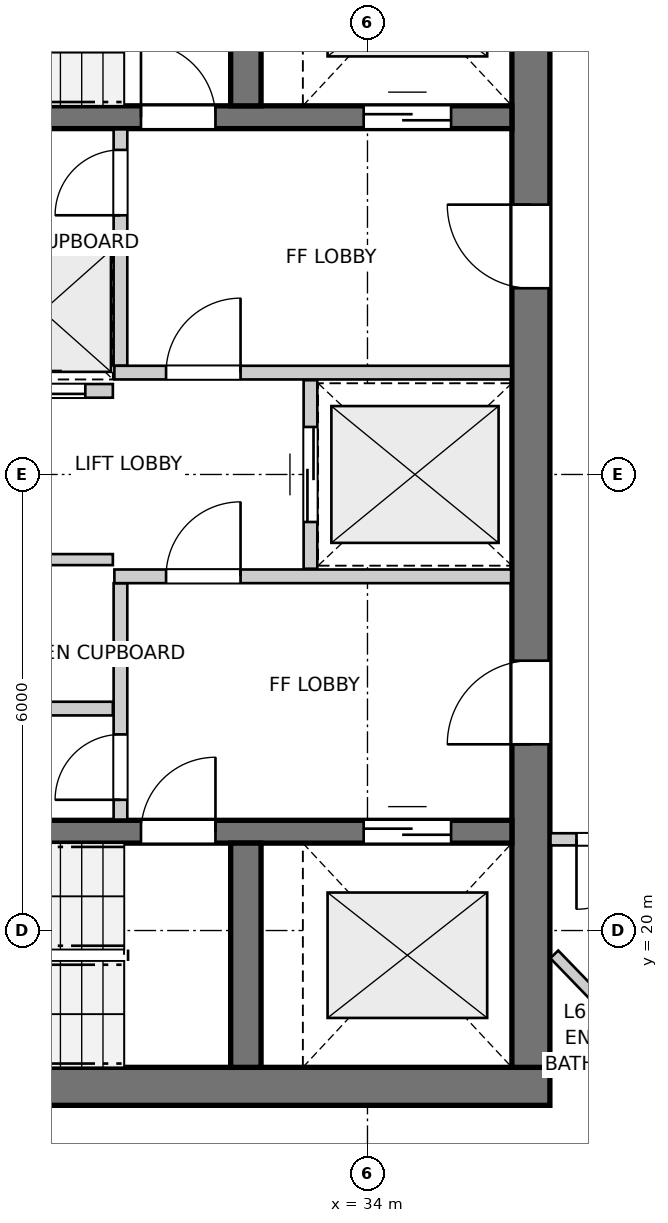
"""IFC4 building model, lengths in metres.
Left out: names, types, materials, properties, quantities, classifications, styles, units other than length and angle.
Written with IfcOpenShell. Run it as: python <this file> out.ifc"""

import sys

from ifc_helpers import new_model, si_unit, direction, frame, frame_2d, origin, place, context, subcontext, project, spatial, rectangle, extrude, source, transform, mapped, element, fill, save


model = new_model("IFC4")
c1 = context("Model", 3, precision=1e-05, world=origin(), true_north=direction((0.0, 1.0)))
c2 = subcontext(c1, "Body", "Model", "MODEL_VIEW")
j1 = project(units=[si_unit("LENGTHUNIT", "METRE"), si_unit("PLANEANGLEUNIT", "RADIAN")], contexts=[c1])
p1 = place(None, origin())
s1 = spatial("IfcSite", under=j1, at=p1, CompositionType="ELEMENT")
p2 = place(p1, origin())
s2 = spatial("IfcBuilding", under=s1, at=p2, CompositionType="ELEMENT")
p3 = place(p2, frame((0.0, 0.0, 205.2)))
s3 = spatial("IfcBuildingStorey", under=s2, at=p3, CompositionType="ELEMENT", Elevation=205.2)
p4 = place(p3, frame((24.3, 17.95, 0.0), z_axis=(0.0, 0.0, 1.0), x_axis=(1.0, 0.0, 0.0)))
e1 = element("IfcWall", 1, at=p4, inside=s3, PredefinedType="SHEAR", context=c2, shape_type="SweptSolid", body=[
    extrude(rectangle(XDim=12.1, YDim=0.5, at=frame_2d((6.05, 0.0))), origin(), (0.0, 0.0, 1.0), 2.935),
])
p5 = place(p3, frame((36.15, 18.2, 0.0), z_axis=(0.0, 0.0, 1.0), x_axis=(0.0, 1.0, 0.0)))
e2 = element("IfcWall", 2, at=p5, inside=s3, PredefinedType="SHEAR", context=c2, shape_type="SweptSolid", body=[
    extrude(rectangle(XDim=15.6, YDim=0.5, at=frame_2d((7.8, 0.0))), origin(), (0.0, 0.0, 1.0), 2.935),
])
p6 = place(p5, frame((4.25, 0.0, 0.0)))
e3 = element("IfcOpeningElement", 3, at=p6, cuts=e2, PredefinedType="OPENING", context=c2, shape_type="SweptSolid", body=[
    extrude(rectangle(XDim=1.1, YDim=2.15, at=frame_2d((0.55, 1.075))), frame((0.0, 0.26, 0.0), z_axis=(0.0, -1.0, 0.0), x_axis=(1.0, 0.0, 0.0)), (0.0, 0.0, 1.0), 0.52),
])
p7 = place(p5, frame((10.25, 0.0, 0.0)))
e4 = element("IfcOpeningElement", 4, at=p7, cuts=e2, PredefinedType="OPENING", context=c2, shape_type="SweptSolid", body=[
    extrude(rectangle(XDim=1.1, YDim=2.15, at=frame_2d((0.55, 1.075))), frame((0.0, 0.26, 0.0), z_axis=(0.0, -1.0, 0.0), x_axis=(1.0, 0.0, 0.0)), (0.0, 0.0, 1.0), 0.52),
])
p8 = place(p3, frame((24.8, 21.3, 0.0), z_axis=(0.0, 0.0, 1.0), x_axis=(1.0, 0.0, 0.0)))
e5 = element("IfcWall", 5, at=p8, inside=s3, PredefinedType="SHEAR", context=c2, shape_type="SweptSolid", body=[
    extrude(rectangle(XDim=11.1, YDim=0.3, at=frame_2d((5.55, 0.0))), origin(), (0.0, 0.0, 1.0), 2.935),
])
p9 = place(p8, frame((6.22, 0.0, 0.0)))
e6 = element("IfcOpeningElement", 6, at=p9, cuts=e5, PredefinedType="OPENING", context=c2, shape_type="SweptSolid", body=[
    extrude(rectangle(XDim=0.98, YDim=2.15, at=frame_2d((0.49, 1.075))), frame((0.0, 0.16, 0.0), z_axis=(0.0, -1.0, 0.0), x_axis=(1.0, 0.0, 0.0)), (0.0, 0.0, 1.0), 0.32),
])
p10 = place(p8, frame((9.15, 0.0, 0.0)))
e7 = element("IfcOpeningElement", 7, at=p10, cuts=e5, PredefinedType="OPENING", context=c2, shape_type="SweptSolid", body=[
    extrude(rectangle(XDim=1.15, YDim=2.15, at=frame_2d((0.575, 1.075))), frame((0.0, 0.16, 0.0), z_axis=(0.0, -1.0, 0.0), x_axis=(1.0, 0.0, 0.0)), (0.0, 0.0, 1.0), 0.32),
])
p11 = place(p3, frame((32.4, 18.2, 0.0), z_axis=(0.0, 0.0, 1.0), x_axis=(0.0, 1.0, 0.0)))
e8 = element("IfcWall", 8, at=p11, inside=s3, PredefinedType="SHEAR", context=c2, shape_type="SweptSolid", body=[
    extrude(rectangle(XDim=2.95, YDim=0.4, at=frame_2d((1.475, 0.0))), origin(), (0.0, 0.0, 1.0), 2.935),
])
p12 = place(p3, frame((24.8, 30.7, 0.0), z_axis=(0.0, 0.0, 1.0), x_axis=(1.0, 0.0, 0.0)))
e9 = element("IfcWall", 9, at=p12, inside=s3, PredefinedType="SHEAR", context=c2, shape_type="SweptSolid", body=[
    extrude(rectangle(XDim=11.1, YDim=0.3, at=frame_2d((5.55, 0.0))), origin(), (0.0, 0.0, 1.0), 2.935),
])
p13 = place(p12, frame((6.22, 0.0, 0.0)))
e10 = element("IfcOpeningElement", 10, at=p13, cuts=e9, PredefinedType="OPENING", context=c2, shape_type="SweptSolid", body=[
    extrude(rectangle(XDim=0.98, YDim=2.15, at=frame_2d((0.49, 1.075))), frame((0.0, 0.16, 0.0), z_axis=(0.0, -1.0, 0.0), x_axis=(1.0, 0.0, 0.0)), (0.0, 0.0, 1.0), 0.32),
])
p14 = place(p12, frame((9.15, 0.0, 0.0)))
e11 = element("IfcOpeningElement", 11, at=p14, cuts=e9, PredefinedType="OPENING", context=c2, shape_type="SweptSolid", body=[
    extrude(rectangle(XDim=1.15, YDim=2.15, at=frame_2d((0.575, 1.075))), frame((0.0, 0.16, 0.0), z_axis=(0.0, -1.0, 0.0), x_axis=(1.0, 0.0, 0.0)), (0.0, 0.0, 1.0), 0.32),
])
p15 = place(p3, frame((32.4, 30.85, 0.0), z_axis=(0.0, 0.0, 1.0), x_axis=(0.0, 1.0, 0.0)))
e12 = element("IfcWall", 12, at=p15, inside=s3, PredefinedType="SHEAR", context=c2, shape_type="SweptSolid", body=[
    extrude(rectangle(XDim=2.95, YDim=0.4, at=frame_2d((1.475, 0.0))), origin(), (0.0, 0.0, 1.0), 2.935),
])
p16 = place(p3, frame((30.75, 21.46, 0.0), z_axis=(0.0, 0.0, 1.0), x_axis=(0.0, 1.0, 0.0)))
e13 = element("IfcWall", 13, at=p16, inside=s3, PredefinedType="PARTITIONING", context=c2, shape_type="SweptSolid", body=[
    extrude(rectangle(XDim=3.11, YDim=0.18, at=frame_2d((1.555, 0.0))), origin(), (0.0, 0.0, 1.0), 2.935),
])
p17 = place(p16, frame((0.26, 0.0, 0.0)))
e14 = element("IfcOpeningElement", 14, at=p17, cuts=e13, PredefinedType="OPENING", context=c2, shape_type="SweptSolid", body=[
    extrude(rectangle(XDim=0.86, YDim=2.05, at=frame_2d((0.43, 1.025))), frame((0.0, 0.1, 0.0), z_axis=(0.0, -1.0, 0.0), x_axis=(1.0, 0.0, 0.0)), (0.0, 0.0, 1.0), 0.2),
])
p18 = place(p3, frame((30.67, 24.66, 0.0), z_axis=(0.0, 0.0, 1.0), x_axis=(1.0, 0.0, 0.0)))
e15 = element("IfcWall", 15, at=p18, inside=s3, PredefinedType="PARTITIONING", context=c2, shape_type="SweptSolid", body=[
    extrude(rectangle(XDim=5.22, YDim=0.18, at=frame_2d((2.61, 0.0))), origin(), (0.0, 0.0, 1.0), 2.935),
])
p19 = place(p18, frame((0.68, 0.0, 0.0)))
e16 = element("IfcOpeningElement", 16, at=p19, cuts=e15, PredefinedType="OPENING", context=c2, shape_type="SweptSolid", body=[
    extrude(rectangle(XDim=0.98, YDim=2.15, at=frame_2d((0.49, 1.075))), frame((0.0, 0.1, 0.0), z_axis=(0.0, -1.0, 0.0), x_axis=(1.0, 0.0, 0.0)), (0.0, 0.0, 1.0), 0.2),
])
p20 = place(p3, frame((30.75, 27.43, 0.0), z_axis=(0.0, 0.0, 1.0), x_axis=(0.0, 1.0, 0.0)))
e17 = element("IfcWall", 17, at=p20, inside=s3, PredefinedType="PARTITIONING", context=c2, shape_type="SweptSolid", body=[
    extrude(rectangle(XDim=3.11, YDim=0.18, at=frame_2d((1.555, 0.0))), origin(), (0.0, 0.0, 1.0), 2.935),
])
p21 = place(p20, frame((1.98, 0.0, 0.0)))
e18 = element("IfcOpeningElement", 18, at=p21, cuts=e17, PredefinedType="OPENING", context=c2, shape_type="SweptSolid", body=[
    extrude(rectangle(XDim=0.86, YDim=2.05, at=frame_2d((0.43, 1.025))), frame((0.0, 0.1, 0.0), z_axis=(0.0, -1.0, 0.0), x_axis=(1.0, 0.0, 0.0)), (0.0, 0.0, 1.0), 0.2),
])
p22 = place(p3, frame((30.67, 27.34, 0.0), z_axis=(0.0, 0.0, 1.0), x_axis=(1.0, 0.0, 0.0)))
e19 = element("IfcWall", 19, at=p22, inside=s3, PredefinedType="PARTITIONING", context=c2, shape_type="SweptSolid", body=[
    extrude(rectangle(XDim=5.22, YDim=0.18, at=frame_2d((2.61, 0.0))), origin(), (0.0, 0.0, 1.0), 2.935),
])
p23 = place(p22, frame((0.68, 0.0, 0.0)))
e20 = element("IfcOpeningElement", 20, at=p23, cuts=e19, PredefinedType="OPENING", context=c2, shape_type="SweptSolid", body=[
    extrude(rectangle(XDim=0.98, YDim=2.15, at=frame_2d((0.49, 1.075))), frame((0.0, 0.1, 0.0), z_axis=(0.0, -1.0, 0.0), x_axis=(1.0, 0.0, 0.0)), (0.0, 0.0, 1.0), 0.2),
])
p24 = place(p3, frame((33.25, 24.76, 0.0), z_axis=(0.0, 0.0, 1.0), x_axis=(0.0, 1.0, 0.0)))
e21 = element("IfcWall", 21, at=p24, inside=s3, PredefinedType="PARTITIONING", context=c2, shape_type="SweptSolid", body=[
    extrude(rectangle(XDim=2.48, YDim=0.18, at=frame_2d((1.24, 0.0))), origin(), (0.0, 0.0, 1.0), 2.935),
])
p25 = place(p24, frame((0.615, 0.0, 0.0)))
e22 = element("IfcOpeningElement", 22, at=p25, cuts=e21, PredefinedType="OPENING", context=c2, shape_type="SweptSolid", body=[
    extrude(rectangle(XDim=1.25, YDim=2.15, at=frame_2d((0.625, 1.075))), frame((0.0, 0.1, 0.0), z_axis=(0.0, -1.0, 0.0), x_axis=(1.0, 0.0, 0.0)), (0.0, 0.0, 1.0), 0.2),
])
p26 = place(p3, frame((24.81, 22.92, 0.0), z_axis=(0.0, 0.0, 1.0), x_axis=(1.0, 0.0, 0.0)))
e23 = element("IfcWall", 23, at=p26, inside=s3, PredefinedType="PARTITIONING", context=c2, shape_type="SweptSolid", body=[
    extrude(rectangle(XDim=5.84, YDim=0.18, at=frame_2d((2.92, 0.0))), origin(), (0.0, 0.0, 1.0), 2.935),
])
p27 = place(p3, frame((28.13, 24.88, 0.0), z_axis=(0.0, 0.0, 1.0), x_axis=(1.0, 0.0, 0.0)))
e24 = element("IfcWall", 24, at=p27, inside=s3, PredefinedType="PARTITIONING", context=c2, shape_type="SweptSolid", body=[
    extrude(rectangle(XDim=2.52, YDim=0.145, at=frame_2d((1.26, 0.0))), origin(), (0.0, 0.0, 1.0), 2.935),
])
p28 = place(p27, frame((0.82, 0.0, 0.0)))
e25 = element("IfcOpeningElement", 25, at=p28, cuts=e24, PredefinedType="OPENING", context=c2, shape_type="SweptSolid", body=[
    extrude(rectangle(XDim=0.86, YDim=2.05, at=frame_2d((0.43, 1.025))), frame((0.0, 0.083, 0.0), z_axis=(0.0, -1.0, 0.0), x_axis=(1.0, 0.0, 0.0)), (0.0, 0.0, 1.0), 0.165),
])
p29 = place(p3, frame((24.81, 29.08, 0.0), z_axis=(0.0, 0.0, 1.0), x_axis=(1.0, 0.0, 0.0)))
e26 = element("IfcWall", 26, at=p29, inside=s3, PredefinedType="PARTITIONING", context=c2, shape_type="SweptSolid", body=[
    extrude(rectangle(XDim=5.84, YDim=0.18, at=frame_2d((2.92, 0.0))), origin(), (0.0, 0.0, 1.0), 2.935),
])
p30 = place(p3, frame((28.825, 27.1, 0.0), z_axis=(0.0, 0.0, 1.0), x_axis=(1.0, 0.0, 0.0)))
e27 = element("IfcWall", 27, at=p30, inside=s3, PredefinedType="PARTITIONING", context=c2, shape_type="SweptSolid", body=[
    extrude(rectangle(XDim=1.825, YDim=0.18, at=frame_2d((0.913, 0.0))), origin(), (0.0, 0.0, 1.0), 2.935),
])
p31 = place(p30, frame((0.363, 0.0, 0.0)))
e28 = element("IfcOpeningElement", 28, at=p31, cuts=e27, PredefinedType="OPENING", context=c2, shape_type="SweptSolid", body=[
    extrude(rectangle(XDim=1.1, YDim=2.15, at=frame_2d((0.55, 1.075))), frame((0.0, 0.1, 0.0), z_axis=(0.0, -1.0, 0.0), x_axis=(1.0, 0.0, 0.0)), (0.0, 0.0, 1.0), 0.2),
])
p32 = place(p3, frame((38.02, 21.2, 0.0), z_axis=(0.0, 0.0, 1.0), x_axis=(-1.0, 0.0, 0.0)))
e29 = element("IfcWall", 29, at=p32, inside=s3, PredefinedType="PARTITIONING", context=c2, shape_type="SweptSolid", body=[
    extrude(rectangle(XDim=1.612, YDim=0.16, at=frame_2d((0.806, 0.0))), origin(), (0.0, 0.0, 1.0), 2.935),
])
p33 = place(p32, frame((0.35, 0.0, 0.0)))
e30 = element("IfcOpeningElement", 30, at=p33, cuts=e29, PredefinedType="OPENING", context=c2, shape_type="SweptSolid", body=[
    extrude(rectangle(XDim=0.92, YDim=2.1, at=frame_2d((0.46, 1.05))), frame((0.0, 0.09, 0.0), z_axis=(0.0, -1.0, 0.0), x_axis=(1.0, 0.0, 0.0)), (0.0, 0.0, 1.0), 0.18),
])
p34 = place(p3, frame((36.458, 19.686, 0.0), z_axis=(0.0, 0.0, 1.0), x_axis=(0.695231916786, -0.718785490868, 0.0)))
e31 = element("IfcWall", 31, at=p34, inside=s3, PredefinedType="PARTITIONING", context=c2, shape_type="SweptSolid", body=[
    extrude(rectangle(XDim=1.824, YDim=0.145, at=frame_2d((0.912, 0.0))), origin(), (0.0, 0.0, 1.0), 2.935),
])
m1 = source(origin(), c2, "Body", "SweptSolid", [
    extrude(rectangle(XDim=0.98, YDim=2.15, at=frame_2d((0.49, 1.075))), frame((0.0, 0.025, 0.0), z_axis=(0.0, -1.0, 0.0), x_axis=(1.0, 0.0, 0.0)), (0.0, 0.0, 1.0), 0.05),
])
p35 = place(p9, origin())
e32 = element("IfcDoor", 32, at=p35, inside=s3, OperationType="SINGLE_SWING_RIGHT", PredefinedType="DOOR", context=c2, shape_type="MappedRepresentation", body=[
    mapped(m1, transform((0.0, 0.0, 0.0), x_axis=(1.0, 0.0, 0.0), y_axis=(0.0, 1.0, 0.0), z_axis=(0.0, 0.0, 1.0), scale=1.0)),
])
fill(e6, e32)
m2 = source(origin(), c2, "Body", "SweptSolid", [
    extrude(rectangle(XDim=1.15, YDim=2.15, at=frame_2d((0.575, 1.075))), frame((0.0, 0.025, 0.0), z_axis=(0.0, -1.0, 0.0), x_axis=(1.0, 0.0, 0.0)), (0.0, 0.0, 1.0), 0.05),
])
p36 = place(p10, origin())
e33 = element("IfcDoor", 33, at=p36, inside=s3, OperationType="DOUBLE_DOOR_SLIDING", PredefinedType="DOOR", context=c2, shape_type="MappedRepresentation", body=[
    mapped(m2, transform((0.0, 0.0, 0.0), x_axis=(1.0, 0.0, 0.0), y_axis=(0.0, 1.0, 0.0), z_axis=(0.0, 0.0, 1.0), scale=1.0)),
])
fill(e7, e33)
p37 = place(p13, origin())
e34 = element("IfcDoor", 34, at=p37, inside=s3, OperationType="SINGLE_SWING_LEFT", PredefinedType="DOOR", context=c2, shape_type="MappedRepresentation", body=[
    mapped(m1, transform((0.0, 0.0, 0.0), x_axis=(1.0, 0.0, 0.0), y_axis=(0.0, 1.0, 0.0), z_axis=(0.0, 0.0, 1.0), scale=1.0)),
])
fill(e10, e34)
p38 = place(p14, origin())
e35 = element("IfcDoor", 35, at=p38, inside=s3, OperationType="DOUBLE_DOOR_SLIDING", PredefinedType="DOOR", context=c2, shape_type="MappedRepresentation", body=[
    mapped(m2, transform((0.0, 0.0, 0.0), x_axis=(1.0, 0.0, 0.0), y_axis=(0.0, 1.0, 0.0), z_axis=(0.0, 0.0, 1.0), scale=1.0)),
])
fill(e11, e35)
m3 = source(origin(), c2, "Body", "SweptSolid", [
    extrude(rectangle(XDim=1.1, YDim=2.15, at=frame_2d((0.55, 1.075))), frame((0.0, 0.025, 0.0), z_axis=(0.0, -1.0, 0.0), x_axis=(1.0, 0.0, 0.0)), (0.0, 0.0, 1.0), 0.05),
])
p39 = place(p6, origin())
e36 = element("IfcDoor", 36, at=p39, inside=s3, OperationType="SINGLE_SWING_LEFT", PredefinedType="DOOR", context=c2, shape_type="MappedRepresentation", body=[
    mapped(m3, transform((0.0, 0.0, 0.0), x_axis=(1.0, 0.0, 0.0), y_axis=(0.0, 1.0, 0.0), z_axis=(0.0, 0.0, 1.0), scale=1.0)),
])
fill(e3, e36)
p40 = place(p7, origin())
e37 = element("IfcDoor", 37, at=p40, inside=s3, OperationType="SINGLE_SWING_RIGHT", PredefinedType="DOOR", context=c2, shape_type="MappedRepresentation", body=[
    mapped(m3, transform((0.0, 0.0, 0.0), x_axis=(1.0, 0.0, 0.0), y_axis=(0.0, 1.0, 0.0), z_axis=(0.0, 0.0, 1.0), scale=1.0)),
])
fill(e4, e37)
m4 = source(origin(), c2, "Body", "SweptSolid", [
    extrude(rectangle(XDim=0.86, YDim=2.05, at=frame_2d((0.43, 1.025))), frame((0.0, 0.025, 0.0), z_axis=(0.0, -1.0, 0.0), x_axis=(1.0, 0.0, 0.0)), (0.0, 0.0, 1.0), 0.05),
])
p41 = place(p17, origin())
e38 = element("IfcDoor", 38, at=p41, inside=s3, OperationType="SINGLE_SWING_LEFT", PredefinedType="DOOR", context=c2, shape_type="MappedRepresentation", body=[
    mapped(m4, transform((0.0, 0.0, 0.0), x_axis=(1.0, 0.0, 0.0), y_axis=(0.0, 1.0, 0.0), z_axis=(0.0, 0.0, 1.0), scale=1.0)),
])
fill(e14, e38)
p42 = place(p19, origin())
e39 = element("IfcDoor", 39, at=p42, inside=s3, OperationType="SINGLE_SWING_RIGHT", PredefinedType="DOOR", context=c2, shape_type="MappedRepresentation", body=[
    mapped(m1, transform((0.0, 0.0, 0.0), x_axis=(1.0, 0.0, 0.0), y_axis=(0.0, 1.0, 0.0), z_axis=(0.0, 0.0, 1.0), scale=1.0)),
])
fill(e16, e39)
p43 = place(p21, origin())
e40 = element("IfcDoor", 40, at=p43, inside=s3, OperationType="SINGLE_SWING_LEFT", PredefinedType="DOOR", context=c2, shape_type="MappedRepresentation", body=[
    mapped(m4, transform((0.0, 0.0, 0.0), x_axis=(1.0, 0.0, 0.0), y_axis=(0.0, 1.0, 0.0), z_axis=(0.0, 0.0, 1.0), scale=1.0)),
])
fill(e18, e40)
p44 = place(p23, origin())
e41 = element("IfcDoor", 41, at=p44, inside=s3, OperationType="SINGLE_SWING_RIGHT", PredefinedType="DOOR", context=c2, shape_type="MappedRepresentation", body=[
    mapped(m1, transform((0.0, 0.0, 0.0), x_axis=(1.0, 0.0, 0.0), y_axis=(0.0, 1.0, 0.0), z_axis=(0.0, 0.0, 1.0), scale=1.0)),
])
fill(e20, e41)
m5 = source(origin(), c2, "Body", "SweptSolid", [
    extrude(rectangle(XDim=1.25, YDim=2.15, at=frame_2d((0.625, 1.075))), frame((0.0, 0.025, 0.0), z_axis=(0.0, -1.0, 0.0), x_axis=(1.0, 0.0, 0.0)), (0.0, 0.0, 1.0), 0.05),
])
p45 = place(p25, origin())
e42 = element("IfcDoor", 42, at=p45, inside=s3, OperationType="DOUBLE_DOOR_SLIDING", PredefinedType="DOOR", context=c2, shape_type="MappedRepresentation", body=[
    mapped(m5, transform((0.0, 0.0, 0.0), x_axis=(1.0, 0.0, 0.0), y_axis=(0.0, 1.0, 0.0), z_axis=(0.0, 0.0, 1.0), scale=1.0)),
])
fill(e22, e42)
p46 = place(p31, origin())
e43 = element("IfcDoor", 43, at=p46, inside=s3, OperationType="DOUBLE_DOOR_SLIDING", PredefinedType="DOOR", context=c2, shape_type="MappedRepresentation", body=[
    mapped(m3, transform((0.0, 0.0, 0.0), x_axis=(1.0, 0.0, 0.0), y_axis=(0.0, 1.0, 0.0), z_axis=(0.0, 0.0, 1.0), scale=1.0)),
])
fill(e28, e43)
m6 = source(origin(), c2, "Body", "SweptSolid", [
    extrude(rectangle(XDim=0.92, YDim=2.1, at=frame_2d((0.46, 1.05))), frame((0.0, 0.025, 0.0), z_axis=(0.0, -1.0, 0.0), x_axis=(1.0, 0.0, 0.0)), (0.0, 0.0, 1.0), 0.05),
])
p47 = place(p33, origin())
e44 = element("IfcDoor", 44, at=p47, inside=s3, OperationType="SINGLE_SWING_RIGHT", PredefinedType="DOOR", context=c2, shape_type="MappedRepresentation", body=[
    mapped(m6, transform((0.0, 0.0, 0.0), x_axis=(1.0, 0.0, 0.0), y_axis=(0.0, 1.0, 0.0), z_axis=(0.0, 0.0, 1.0), scale=1.0)),
])
fill(e30, e44)
save(model, sys.argv[1])
